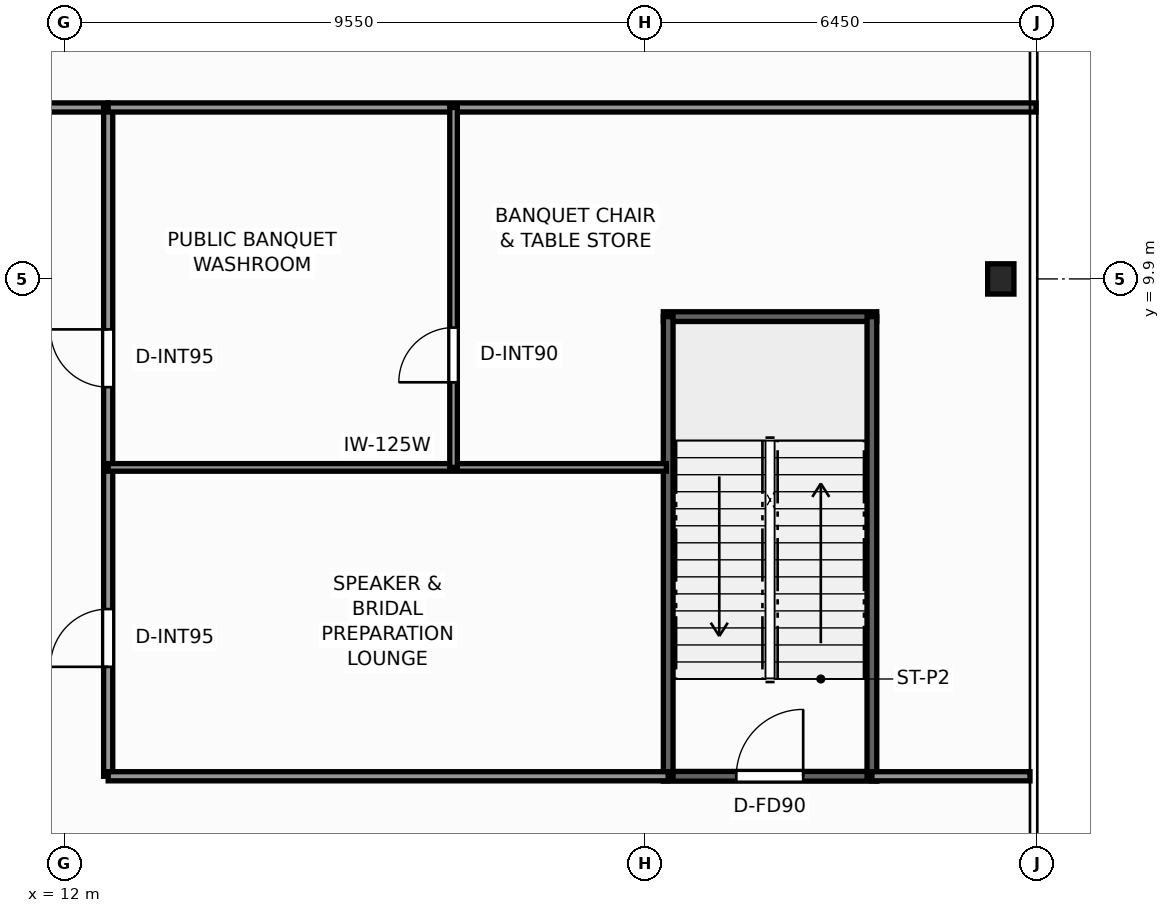
"""IFC4 building model, lengths in metres.
Left out: names, types, materials, properties, quantities, classifications, styles, units other than length and angle.
Written with IfcOpenShell. Run it as: python <this file> out.ifc"""

import sys

from ifc_helpers import new_model, si_unit, direction, frame, frame_2d, origin, origin_2d, place, context, subcontext, project, spatial, rectangle, i_section, extrude, element, fill, save


model = new_model("IFC4")
c1 = context("Model", 3, precision=1e-05, world=origin(), true_north=direction((0.0, 1.0)))
c2 = subcontext(c1, "Body", "Model", "MODEL_VIEW")
j1 = project(units=[si_unit("LENGTHUNIT", "METRE"), si_unit("PLANEANGLEUNIT", "RADIAN")], contexts=[c1])
p1 = place(None, origin())
s1 = spatial("IfcSite", under=j1, at=p1, CompositionType="ELEMENT")
p2 = place(p1, origin())
s2 = spatial("IfcBuilding", under=s1, at=p2, CompositionType="ELEMENT")
p3 = place(p2, frame((0.0, 0.0, 10.0)))
s3 = spatial("IfcBuildingStorey", under=s2, at=p3, CompositionType="ELEMENT", Elevation=10.0)
p4 = place(p3, frame((27.4, 9.9, 0.0), z_axis=(0.0, 0.0, 1.0), x_axis=(1.0, 0.0, 0.0)))
e1 = element("IfcColumn", 1, at=p4, inside=s3, PredefinedType="COLUMN", context=c2, shape_type="SweptSolid", body=[
    extrude(i_section(OverallWidth=0.432, OverallDepth=0.498, WebThickness=0.056, FlangeThickness=0.089, FilletRadius=0.025, at=origin_2d()), origin(), (0.0, 0.0, 1.0), 5.2),
])
p5 = place(p3, frame((21.85, 1.72, 0.0), z_axis=(0.0, 0.0, 1.0), x_axis=(1.0, 0.0, 0.0)))
e2 = element("IfcWall", 2, at=p5, inside=s3, PredefinedType="SHEAR", context=c2, shape_type="SweptSolid", body=[
    extrude(rectangle(XDim=3.51, YDim=0.16, at=frame_2d((1.755, 0.0))), origin(), (0.0, 0.0, 1.0), 5.2),
])
p6 = place(p5, frame((1.2, 0.0, 0.0)))
e3 = element("IfcOpeningElement", 3, at=p6, cuts=e2, PredefinedType="OPENING", context=c2, shape_type="SweptSolid", body=[
    extrude(rectangle(XDim=1.1, YDim=2.2, at=frame_2d((0.55, 1.1))), frame((0.0, 0.09, 0.0), z_axis=(0.0, -1.0, 0.0), x_axis=(1.0, 0.0, 0.0)), (0.0, 0.0, 1.0), 0.18),
])
p7 = place(p3, frame((21.85, 9.28, 0.0), z_axis=(0.0, 0.0, 1.0), x_axis=(1.0, 0.0, 0.0)))
e4 = element("IfcWall", 4, at=p7, inside=s3, PredefinedType="SHEAR", context=c2, shape_type="SweptSolid", body=[
    extrude(rectangle(XDim=3.51, YDim=0.16, at=frame_2d((1.755, 0.0))), origin(), (0.0, 0.0, 1.0), 5.2),
])
for number, where, z_axis, x_axis in (
    (5, (21.93, 1.72, 0.0), (0.0, 0.0, 1.0), (0.0, 1.0, 0.0)),
    (6, (25.28, 1.72, 0.0), (0.0, 0.0, 1.0), (0.0, 1.0, 0.0)),
):
    element("IfcWall", number, at=place(p3, frame(where, z_axis=z_axis, x_axis=x_axis)), inside=s3, PredefinedType="SHEAR", context=c2, shape_type="SweptSolid", body=[
        extrude(rectangle(XDim=7.56, YDim=0.16, at=frame_2d((3.78, 0.0))), origin(), (0.0, 0.0, 1.0), 5.2),
    ])
p8 = place(p3, frame((-12.72, 12.72, 0.0), z_axis=(0.0, 0.0, 1.0), x_axis=(1.0, 0.0, 0.0)))
e7 = element("IfcWall", 7, at=p8, inside=s3, PredefinedType="PARTITIONING", context=c2, shape_type="SweptSolid", body=[
    extrude(rectangle(XDim=25.44, YDim=0.15, at=frame_2d((12.72, 0.0))), origin(), (0.0, 0.0, 1.0), 3.894),
])
p9 = place(p8, frame((1.8, 0.0, 0.0)))
e8 = element("IfcOpeningElement", 8, at=p9, cuts=e7, PredefinedType="OPENING", context=c2, shape_type="SweptSolid", body=[
    extrude(rectangle(XDim=0.95, YDim=2.06, at=frame_2d((0.475, 1.03))), frame((0.0, 0.085, 0.0), z_axis=(0.0, -1.0, 0.0), x_axis=(1.0, 0.0, 0.0)), (0.0, 0.0, 1.0), 0.17),
])
p10 = place(p8, frame((9.2, 0.0, 0.0)))
e9 = element("IfcOpeningElement", 9, at=p10, cuts=e7, PredefinedType="OPENING", context=c2, shape_type="SweptSolid", body=[
    extrude(rectangle(XDim=1.2, YDim=2.2, at=frame_2d((0.6, 1.1))), frame((0.0, 0.085, 0.0), z_axis=(0.0, -1.0, 0.0), x_axis=(1.0, 0.0, 0.0)), (0.0, 0.0, 1.0), 0.17),
])
p11 = place(p8, frame((19.2, 0.0, 0.0)))
e10 = element("IfcOpeningElement", 10, at=p11, cuts=e7, PredefinedType="OPENING", context=c2, shape_type="SweptSolid", body=[
    extrude(rectangle(XDim=1.1, YDim=2.2, at=frame_2d((0.55, 1.1))), frame((0.0, 0.085, 0.0), z_axis=(0.0, -1.0, 0.0), x_axis=(1.0, 0.0, 0.0)), (0.0, 0.0, 1.0), 0.17),
])
p12 = place(p3, frame((12.72, 1.72, 0.0), z_axis=(0.0, 0.0, 1.0), x_axis=(0.0, 1.0, 0.0)))
e11 = element("IfcWall", 11, at=p12, inside=s3, PredefinedType="PARTITIONING", context=c2, shape_type="SweptSolid", body=[
    extrude(rectangle(XDim=11.0, YDim=0.15, at=frame_2d((5.5, 0.0))), origin(), (0.0, 0.0, 1.0), 3.894),
])
p13 = place(p12, frame((1.8, 0.0, 0.0)))
e12 = element("IfcOpeningElement", 12, at=p13, cuts=e11, PredefinedType="OPENING", context=c2, shape_type="SweptSolid", body=[
    extrude(rectangle(XDim=0.95, YDim=2.06, at=frame_2d((0.475, 1.03))), frame((0.0, 0.085, 0.0), z_axis=(0.0, -1.0, 0.0), x_axis=(1.0, 0.0, 0.0)), (0.0, 0.0, 1.0), 0.17),
])
p14 = place(p12, frame((6.4, 0.0, 0.0)))
e13 = element("IfcOpeningElement", 13, at=p14, cuts=e11, PredefinedType="OPENING", context=c2, shape_type="SweptSolid", body=[
    extrude(rectangle(XDim=0.95, YDim=2.06, at=frame_2d((0.475, 1.03))), frame((0.0, 0.085, 0.0), z_axis=(0.0, -1.0, 0.0), x_axis=(1.0, 0.0, 0.0)), (0.0, 0.0, 1.0), 0.17),
])
p15 = place(p3, frame((12.72, 1.72, 0.0), z_axis=(0.0, 0.0, 1.0), x_axis=(1.0, 0.0, 0.0)))
e14 = element("IfcWall", 14, at=p15, inside=s3, PredefinedType="PARTITIONING", context=c2, shape_type="SweptSolid", body=[
    extrude(rectangle(XDim=9.21, YDim=0.15, at=frame_2d((4.605, 0.0))), origin(), (0.0, 0.0, 1.0), 4.92),
])
p16 = place(p3, frame((25.28, 1.72, 0.0), z_axis=(0.0, 0.0, 1.0), x_axis=(1.0, 0.0, 0.0)))
e15 = element("IfcWall", 15, at=p16, inside=s3, PredefinedType="PARTITIONING", context=c2, shape_type="SweptSolid", body=[
    extrude(rectangle(XDim=2.6, YDim=0.15, at=frame_2d((1.3, 0.0))), origin(), (0.0, 0.0, 1.0), 4.289),
])
p17 = place(p3, frame((12.72, 12.72, 0.0), z_axis=(0.0, 0.0, 1.0), x_axis=(1.0, 0.0, 0.0)))
e16 = element("IfcWall", 16, at=p17, inside=s3, PredefinedType="PARTITIONING", context=c2, shape_type="SweptSolid", body=[
    extrude(rectangle(XDim=15.26, YDim=0.15, at=frame_2d((7.63, 0.0))), origin(), (0.0, 0.0, 1.0), 4.289),
])
p18 = place(p3, frame((12.72, 6.8, 0.0), z_axis=(0.0, 0.0, 1.0), x_axis=(1.0, 0.0, 0.0)))
e17 = element("IfcWall", 17, at=p18, inside=s3, PredefinedType="PARTITIONING", context=c2, shape_type="SweptSolid", body=[
    extrude(rectangle(XDim=9.18, YDim=0.125, at=frame_2d((4.59, 0.0))), origin(), (0.0, 0.0, 1.0), 4.92),
])
p19 = place(p3, frame((18.4, 6.8, 0.0), z_axis=(0.0, 0.0, 1.0), x_axis=(0.0, 1.0, 0.0)))
e18 = element("IfcWall", 18, at=p19, inside=s3, PredefinedType="PARTITIONING", context=c2, shape_type="SweptSolid", body=[
    extrude(rectangle(XDim=5.92, YDim=0.125, at=frame_2d((2.96, 0.0))), origin(), (0.0, 0.0, 1.0), 3.894),
])
p20 = place(p19, frame((1.4, 0.0, 0.0)))
e19 = element("IfcOpeningElement", 19, at=p20, cuts=e18, PredefinedType="OPENING", context=c2, shape_type="SweptSolid", body=[
    extrude(rectangle(XDim=0.9, YDim=2.06, at=frame_2d((0.45, 1.03))), frame((0.0, 0.073, 0.0), z_axis=(0.0, -1.0, 0.0), x_axis=(1.0, 0.0, 0.0)), (0.0, 0.0, 1.0), 0.145),
])
p21 = place(p6, origin())
e20 = element("IfcDoor", 20, at=p21, inside=s3, OperationType="SINGLE_SWING_RIGHT", PredefinedType="DOOR", context=c2, shape_type="SweptSolid", body=[
    extrude(rectangle(XDim=1.1, YDim=2.2, at=frame_2d((0.55, 1.1))), frame((0.0, 0.025, 0.0), z_axis=(0.0, -1.0, 0.0), x_axis=(1.0, 0.0, 0.0)), (0.0, 0.0, 1.0), 0.05),
])
fill(e3, e20)
p22 = place(p13, origin())
e21 = element("IfcDoor", 21, at=p22, inside=s3, OperationType="SINGLE_SWING_LEFT", PredefinedType="DOOR", context=c2, shape_type="SweptSolid", body=[
    extrude(rectangle(XDim=0.95, YDim=2.06, at=frame_2d((0.475, 1.03))), frame((0.0, 0.025, 0.0), z_axis=(0.0, -1.0, 0.0), x_axis=(1.0, 0.0, 0.0)), (0.0, 0.0, 1.0), 0.05),
])
fill(e12, e21)
p23 = place(p14, origin())
e22 = element("IfcDoor", 22, at=p23, inside=s3, OperationType="SINGLE_SWING_RIGHT", PredefinedType="DOOR", context=c2, shape_type="SweptSolid", body=[
    extrude(rectangle(XDim=0.95, YDim=2.06, at=frame_2d((0.475, 1.03))), frame((0.0, 0.025, 0.0), z_axis=(0.0, -1.0, 0.0), x_axis=(1.0, 0.0, 0.0)), (0.0, 0.0, 1.0), 0.05),
])
fill(e13, e22)
p24 = place(p20, origin())
e23 = element("IfcDoor", 23, at=p24, inside=s3, OperationType="SINGLE_SWING_LEFT", PredefinedType="DOOR", context=c2, shape_type="SweptSolid", body=[
    extrude(rectangle(XDim=0.9, YDim=2.06, at=frame_2d((0.45, 1.03))), frame((0.0, 0.025, 0.0), z_axis=(0.0, -1.0, 0.0), x_axis=(1.0, 0.0, 0.0)), (0.0, 0.0, 1.0), 0.05),
])
fill(e19, e23)
save(model, sys.argv[1])
